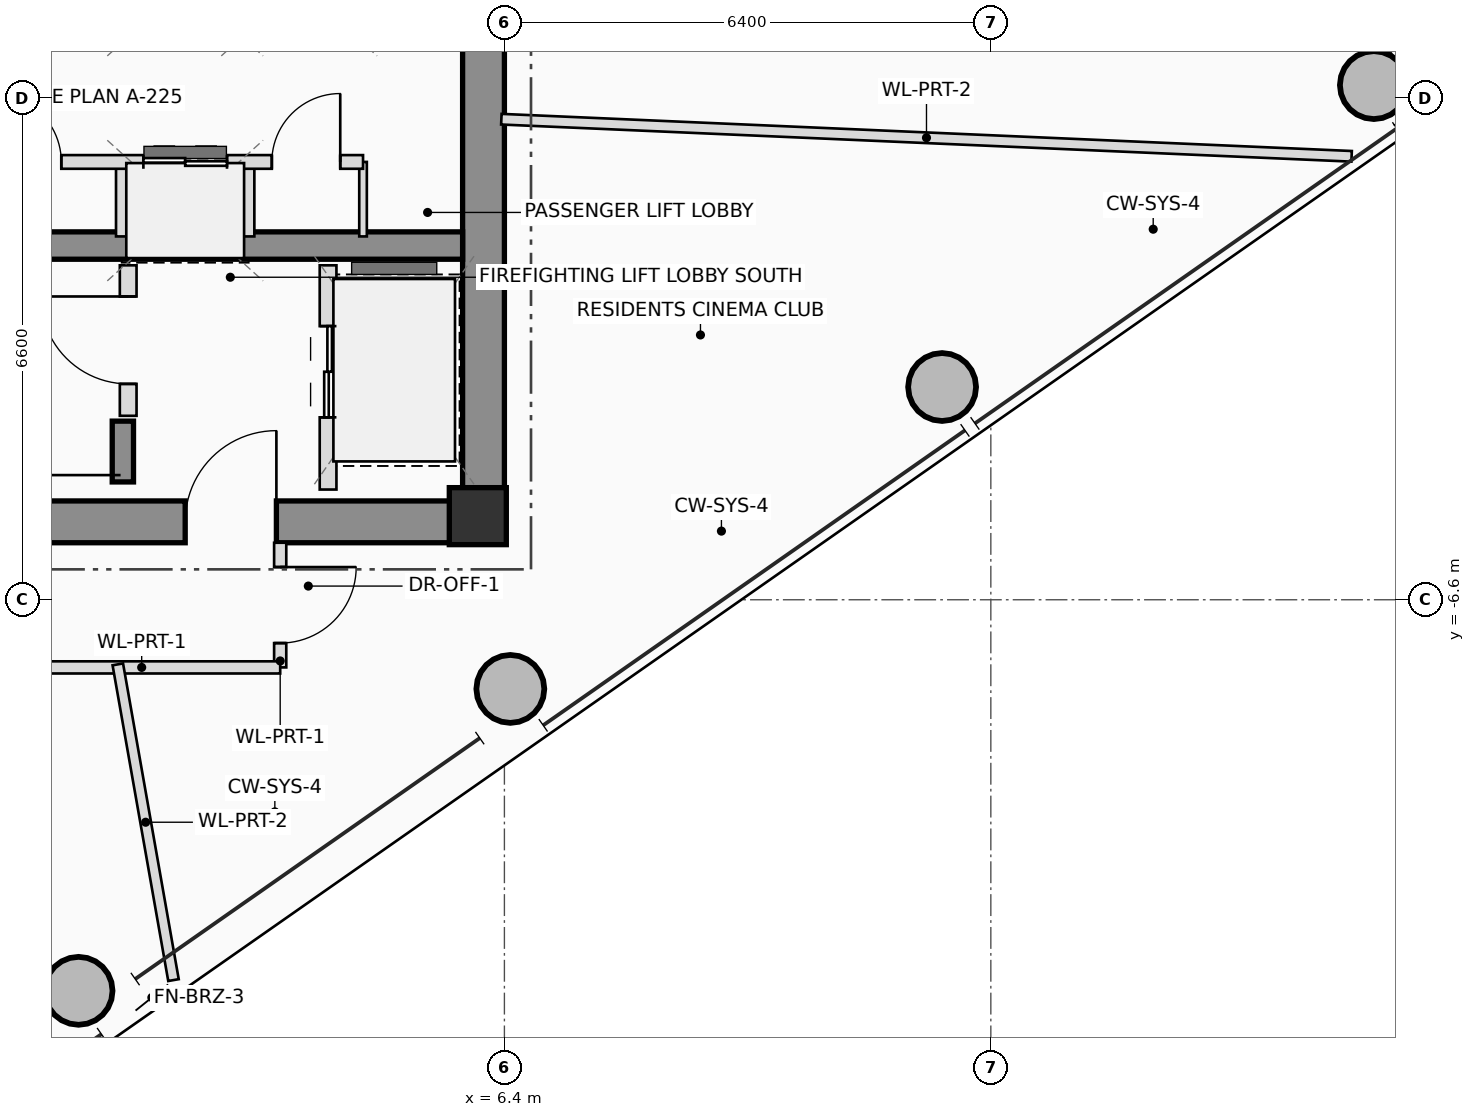
"""IFC4 building model, lengths in metres.
Left out: names, types, materials, properties, quantities, classifications, styles, units other than length and angle.
Written with IfcOpenShell. Run it as: python <this file> out.ifc"""

import sys

from ifc_helpers import new_model, si_unit, direction, frame, frame_2d, origin, origin_2d, place, context, subcontext, project, spatial, rectangle, hollow_circle, extrude, source, transform, mapped, element, fill, save


model = new_model("IFC4")
c1 = context("Model", 3, precision=1e-05, world=origin(), true_north=direction((0.0, 1.0)))
c2 = subcontext(c1, "Body", "Model", "MODEL_VIEW")
j1 = project(units=[si_unit("LENGTHUNIT", "METRE"), si_unit("PLANEANGLEUNIT", "RADIAN")], contexts=[c1])
p1 = place(None, origin())
s1 = spatial("IfcSite", under=j1, at=p1, CompositionType="ELEMENT")
p2 = place(p1, origin())
s2 = spatial("IfcBuilding", under=s1, at=p2, CompositionType="ELEMENT")
p3 = place(p2, frame((0.0, 0.0, 271.15)))
s3 = spatial("IfcBuildingStorey", under=s2, at=p3, CompositionType="ELEMENT", Elevation=271.15)
m1 = source(origin(), c2, "Body", "SweptSolid", [
    extrude(rectangle(XDim=0.75, YDim=0.75, at=origin_2d()), origin(), (0.0, 0.0, 1.0), 3.4),
])
p4 = place(p3, frame((6.05, -5.5, 0.0), z_axis=(0.0, 0.0, 1.0), x_axis=(1.0, 0.0, 0.0)))
e1 = element("IfcColumn", 1, at=p4, inside=s3, PredefinedType="COLUMN", context=c2, shape_type="MappedRepresentation", body=[
    mapped(m1, transform((0.0, 0.0, 0.0), scale=1.0)),
])
p5 = place(p3, frame((-6.4, -5.575, 0.0), z_axis=(0.0, 0.0, 1.0), x_axis=(1.0, 0.0, 0.0)))
e2 = element("IfcWall", 2, at=p5, inside=s3, PredefinedType="SHEAR", context=c2, shape_type="SweptSolid", body=[
    extrude(rectangle(XDim=12.8, YDim=0.55, at=frame_2d((6.4, 0.0))), origin(), (0.0, 0.0, 1.0), 3.4),
])
p6 = place(p5, frame((8.6, 0.0, 0.0)))
e3 = element("IfcOpeningElement", 3, at=p6, cuts=e2, PredefinedType="OPENING", context=c2, shape_type="SweptSolid", body=[
    extrude(rectangle(XDim=1.2, YDim=2.2, at=frame_2d((0.6, 1.1))), frame((0.0, 0.285, 0.0), z_axis=(0.0, -1.0, 0.0), x_axis=(1.0, 0.0, 0.0)), (0.0, 0.0, 1.0), 0.57),
])
p7 = place(p3, frame((6.125, -5.3, 0.0), z_axis=(0.0, 0.0, 1.0), x_axis=(0.0, 1.0, 0.0)))
e4 = element("IfcWall", 4, at=p7, inside=s3, PredefinedType="SHEAR", context=c2, shape_type="SweptSolid", body=[
    extrude(rectangle(XDim=10.6, YDim=0.55, at=frame_2d((5.3, 0.0))), origin(), (0.0, 0.0, 1.0), 3.4),
])
p8 = place(p3, frame((-5.85, -1.94, 0.0), z_axis=(0.0, 0.0, 1.0), x_axis=(1.0, 0.0, 0.0)))
e5 = element("IfcWall", 5, at=p8, inside=s3, PredefinedType="SHEAR", context=c2, shape_type="SweptSolid", body=[
    extrude(rectangle(XDim=11.7, YDim=0.36, at=frame_2d((5.85, 0.0))), origin(), (0.0, 0.0, 1.0), 3.4),
])
p9 = place(p3, frame((1.38, -5.05, 0.0), z_axis=(0.0, 0.0, 1.0), x_axis=(0.0, 1.0, 0.0)))
e6 = element("IfcWall", 6, at=p9, inside=s3, PredefinedType="SHEAR", context=c2, shape_type="SweptSolid", body=[
    extrude(rectangle(XDim=0.8, YDim=0.28, at=frame_2d((0.4, 0.0))), origin(), (0.0, 0.0, 1.0), 3.4),
])
m2 = source(origin(), c2, "Body", "SweptSolid", [
    extrude(hollow_circle(Radius=0.45, WallThickness=0.032, at=origin_2d()), origin(), (0.0, 0.0, 1.0), 3.4),
])
for number, where, z_axis, x_axis in (
    (7, (0.797, -11.745, 0.0), (0.0, 0.0, 1.0), (1.0, 0.0, 0.0)),
    (8, (6.478, -7.773, 0.0), (0.0, 0.0, 1.0), (1.0, 0.0, 0.0)),
    (9, (12.159, -3.801, 0.0), (0.0, 0.0, 1.0), (1.0, 0.0, 0.0)),
    (10, (17.84, 0.171, 0.0), (0.0, 0.0, 1.0), (1.0, 0.0, 0.0)),
):
    element("IfcColumn", number, at=place(p3, frame(where, z_axis=z_axis, x_axis=x_axis)), inside=s3, PredefinedType="COLUMN", context=c2, shape_type="MappedRepresentation", body=[
        mapped(m2, transform((0.0, 0.0, 0.0), scale=1.0)),
    ])
p10 = place(p3, frame((1.45, -4.18, 0.0), z_axis=(0.0, 0.0, 1.0), x_axis=(0.0, 1.0, 0.0)))
e11 = element("IfcWall", 11, at=p10, inside=s3, PredefinedType="PLUMBINGWALL", context=c2, shape_type="SweptSolid", body=[
    extrude(rectangle(XDim=1.98, YDim=0.22, at=frame_2d((0.99, 0.0))), origin(), (0.0, 0.0, 1.0), 3.2),
])
p11 = place(p10, frame((0.42, 0.0, 0.0)))
e12 = element("IfcOpeningElement", 12, at=p11, cuts=e11, PredefinedType="OPENING", context=c2, shape_type="SweptSolid", body=[
    extrude(rectangle(XDim=1.15, YDim=2.15, at=frame_2d((0.575, 1.075))), frame((0.0, 0.12, 0.0), z_axis=(0.0, -1.0, 0.0), x_axis=(1.0, 0.0, 0.0)), (0.0, 0.0, 1.0), 0.24),
])
p12 = place(p3, frame((4.08, -5.15, 0.0), z_axis=(0.0, 0.0, 1.0), x_axis=(0.0, 1.0, 0.0)))
e13 = element("IfcWall", 13, at=p12, inside=s3, PredefinedType="PLUMBINGWALL", context=c2, shape_type="SweptSolid", body=[
    extrude(rectangle(XDim=2.95, YDim=0.22, at=frame_2d((1.475, 0.0))), origin(), (0.0, 0.0, 1.0), 3.2),
])
p13 = place(p12, frame((0.95, 0.0, 0.0)))
e14 = element("IfcOpeningElement", 14, at=p13, cuts=e13, PredefinedType="OPENING", context=c2, shape_type="SweptSolid", body=[
    extrude(rectangle(XDim=1.2, YDim=2.25, at=frame_2d((0.6, 1.125))), frame((0.0, 0.12, 0.0), z_axis=(0.0, -1.0, 0.0), x_axis=(1.0, 0.0, 0.0)), (0.0, 0.0, 1.0), 0.24),
])
for number, where, z_axis, x_axis in (
    (15, (1.38, -1.82, 0.0), (0.0, 0.0, 1.0), (0.0, 1.0, 0.0)),
    (16, (3.02, -1.82, 0.0), (0.0, 0.0, 1.0), (0.0, 1.0, 0.0)),
):
    element("IfcWall", number, at=place(p3, frame(where, z_axis=z_axis, x_axis=x_axis)), inside=s3, PredefinedType="PLUMBINGWALL", context=c2, shape_type="SweptSolid", body=[
        extrude(rectangle(XDim=0.98, YDim=0.18, at=frame_2d((0.49, 0.0))), origin(), (0.0, 0.0, 1.0), 3.2),
    ])
p14 = place(p3, frame((4.54, -1.82, 0.0), z_axis=(0.0, 0.0, 1.0), x_axis=(0.0, 1.0, 0.0)))
e17 = element("IfcWall", 17, at=p14, inside=s3, PredefinedType="PARTITIONING", context=c2, shape_type="SweptSolid", body=[
    extrude(rectangle(XDim=0.98, YDim=0.1, at=frame_2d((0.49, 0.0))), origin(), (0.0, 0.0, 1.0), 3.2),
])
p15 = place(p3, frame((-5.68, -0.84, 0.0), z_axis=(0.0, 0.0, 1.0), x_axis=(1.0, 0.0, 0.0)))
e18 = element("IfcWall", 18, at=p15, inside=s3, PredefinedType="PLUMBINGWALL", context=c2, shape_type="SweptSolid", body=[
    extrude(rectangle(XDim=10.22, YDim=0.18, at=frame_2d((5.11, 0.0))), origin(), (0.0, 0.0, 1.0), 3.2),
])
p16 = place(p15, frame((1.88, 0.0, 0.0)))
e19 = element("IfcOpeningElement", 19, at=p16, cuts=e18, PredefinedType="OPENING", context=c2, shape_type="SweptSolid", body=[
    extrude(rectangle(XDim=0.9, YDim=2.05, at=frame_2d((0.45, 1.025))), frame((0.0, 0.1, 0.0), z_axis=(0.0, -1.0, 0.0), x_axis=(1.0, 0.0, 0.0)), (0.0, 0.0, 1.0), 0.2),
])
p17 = place(p15, frame((5.35, 0.0, 0.0)))
e20 = element("IfcOpeningElement", 20, at=p17, cuts=e18, PredefinedType="OPENING", context=c2, shape_type="SweptSolid", body=[
    extrude(rectangle(XDim=0.9, YDim=2.05, at=frame_2d((0.45, 1.025))), frame((0.0, 0.1, 0.0), z_axis=(0.0, -1.0, 0.0), x_axis=(1.0, 0.0, 0.0)), (0.0, 0.0, 1.0), 0.2),
])
p18 = place(p15, frame((7.33, 0.0, 0.0)))
e21 = element("IfcOpeningElement", 21, at=p18, cuts=e18, PredefinedType="OPENING", context=c2, shape_type="SweptSolid", body=[
    extrude(rectangle(XDim=1.1, YDim=2.2, at=frame_2d((0.55, 1.1))), frame((0.0, 0.1, 0.0), z_axis=(0.0, -1.0, 0.0), x_axis=(1.0, 0.0, 0.0)), (0.0, 0.0, 1.0), 0.2),
])
p19 = place(p15, frame((9.02, 0.0, 0.0)))
e22 = element("IfcOpeningElement", 22, at=p19, cuts=e18, PredefinedType="OPENING", context=c2, shape_type="SweptSolid", body=[
    extrude(rectangle(XDim=0.9, YDim=2.05, at=frame_2d((0.45, 1.025))), frame((0.0, 0.1, 0.0), z_axis=(0.0, -1.0, 0.0), x_axis=(1.0, 0.0, 0.0)), (0.0, 0.0, 1.0), 0.2),
])
p20 = place(p3, frame((3.45, -5.85, 0.0), z_axis=(0.0, 0.0, 1.0), x_axis=(0.0, -1.0, 0.0)))
e23 = element("IfcWall", 23, at=p20, inside=s3, PredefinedType="PARTITIONING", context=c2, shape_type="SweptSolid", body=[
    extrude(rectangle(XDim=1.64, YDim=0.16, at=frame_2d((0.82, 0.0))), origin(), (0.0, 0.0, 1.0), 3.2),
])
p21 = place(p20, frame((0.32, 0.0, 0.0)))
e24 = element("IfcOpeningElement", 24, at=p21, cuts=e23, PredefinedType="OPENING", context=c2, shape_type="SweptSolid", body=[
    extrude(rectangle(XDim=1.0, YDim=2.25, at=frame_2d((0.5, 1.125))), frame((0.0, 0.09, 0.0), z_axis=(0.0, -1.0, 0.0), x_axis=(1.0, 0.0, 0.0)), (0.0, 0.0, 1.0), 0.18),
])
p22 = place(p3, frame((3.45, -7.49, 0.0), z_axis=(0.0, 0.0, 1.0), x_axis=(-1.0, 0.0, 0.0)))
e25 = element("IfcWall", 25, at=p22, inside=s3, PredefinedType="PARTITIONING", context=c2, shape_type="SweptSolid", body=[
    extrude(rectangle(XDim=9.81, YDim=0.16, at=frame_2d((4.905, 0.0))), origin(), (0.0, 0.0, 1.0), 2.605),
])
p23 = place(p22, frame((3.795, 0.0, 0.0)))
e26 = element("IfcOpeningElement", 26, at=p23, cuts=e25, PredefinedType="OPENING", context=c2, shape_type="SweptSolid", body=[
    extrude(rectangle(XDim=1.0, YDim=2.25, at=frame_2d((0.5, 1.125))), frame((0.0, 0.09, 0.0), z_axis=(0.0, -1.0, 0.0), x_axis=(1.0, 0.0, 0.0)), (0.0, 0.0, 1.0), 0.18),
])
p24 = place(p22, frame((7.553, 0.0, 0.0)))
e27 = element("IfcOpeningElement", 27, at=p24, cuts=e25, PredefinedType="OPENING", context=c2, shape_type="SweptSolid", body=[
    extrude(rectangle(XDim=1.0, YDim=2.25, at=frame_2d((0.5, 1.125))), frame((0.0, 0.09, 0.0), z_axis=(0.0, -1.0, 0.0), x_axis=(1.0, 0.0, 0.0)), (0.0, 0.0, 1.0), 0.18),
])
p25 = place(p3, frame((6.36, -0.278, 0.0), z_axis=(0.0, 0.0, 1.0), x_axis=(0.999047788643, -0.043629302162, 0.0)))
e28 = element("IfcWall", 28, at=p25, inside=s3, PredefinedType="PARTITIONING", context=c2, shape_type="SweptSolid", body=[
    extrude(rectangle(XDim=11.197, YDim=0.14, at=frame_2d((5.599, 0.0))), origin(), (0.0, 0.0, 1.0), 2.765),
])
p26 = place(p3, frame((1.314, -7.45, 0.0), z_axis=(0.0, 0.0, 1.0), x_axis=(0.17364664795, -0.984808022741, 0.0)))
e29 = element("IfcWall", 29, at=p26, inside=s3, PredefinedType="PARTITIONING", context=c2, shape_type="SweptSolid", body=[
    extrude(rectangle(XDim=4.218, YDim=0.14, at=frame_2d((2.109, 0.0))), origin(), (0.0, 0.0, 1.0), 2.605),
])
p27 = place(p6, origin())
e30 = element("IfcDoor", 30, at=p27, inside=s3, OperationType="SINGLE_SWING_RIGHT", PredefinedType="DOOR", context=c2, shape_type="SweptSolid", body=[
    extrude(rectangle(XDim=1.2, YDim=2.2, at=frame_2d((0.6, 1.1))), frame((0.0, 0.025, 0.0), z_axis=(0.0, -1.0, 0.0), x_axis=(1.0, 0.0, 0.0)), (0.0, 0.0, 1.0), 0.05),
])
fill(e3, e30)
p28 = place(p11, origin())
e31 = element("IfcDoor", 31, at=p28, inside=s3, OperationType="SINGLE_SWING_RIGHT", PredefinedType="DOOR", context=c2, shape_type="SweptSolid", body=[
    extrude(rectangle(XDim=1.15, YDim=2.15, at=frame_2d((0.575, 1.075))), frame((0.0, 0.025, 0.0), z_axis=(0.0, -1.0, 0.0), x_axis=(1.0, 0.0, 0.0)), (0.0, 0.0, 1.0), 0.05),
])
fill(e12, e31)
p29 = place(p13, origin())
e32 = element("IfcDoor", 32, at=p29, inside=s3, OperationType="DOUBLE_DOOR_SLIDING", PredefinedType="DOOR", context=c2, shape_type="SweptSolid", body=[
    extrude(rectangle(XDim=1.2, YDim=2.25, at=frame_2d((0.6, 1.125))), frame((0.0, 0.025, 0.0), z_axis=(0.0, -1.0, 0.0), x_axis=(1.0, 0.0, 0.0)), (0.0, 0.0, 1.0), 0.05),
])
fill(e14, e32)
p30 = place(p17, origin())
e33 = element("IfcDoor", 33, at=p30, inside=s3, OperationType="SINGLE_SWING_LEFT", PredefinedType="DOOR", context=c2, shape_type="SweptSolid", body=[
    extrude(rectangle(XDim=0.9, YDim=2.05, at=frame_2d((0.45, 1.025))), frame((0.0, 0.025, 0.0), z_axis=(0.0, -1.0, 0.0), x_axis=(1.0, 0.0, 0.0)), (0.0, 0.0, 1.0), 0.05),
])
fill(e20, e33)
p31 = place(p18, origin())
e34 = element("IfcDoor", 34, at=p31, inside=s3, OperationType="DOUBLE_DOOR_SLIDING", PredefinedType="DOOR", context=c2, shape_type="SweptSolid", body=[
    extrude(rectangle(XDim=1.1, YDim=2.2, at=frame_2d((0.55, 1.1))), frame((0.0, 0.025, 0.0), z_axis=(0.0, -1.0, 0.0), x_axis=(1.0, 0.0, 0.0)), (0.0, 0.0, 1.0), 0.05),
])
fill(e21, e34)
p32 = place(p19, origin())
e35 = element("IfcDoor", 35, at=p32, inside=s3, OperationType="SINGLE_SWING_RIGHT", PredefinedType="DOOR", context=c2, shape_type="SweptSolid", body=[
    extrude(rectangle(XDim=0.9, YDim=2.05, at=frame_2d((0.45, 1.025))), frame((0.0, 0.025, 0.0), z_axis=(0.0, -1.0, 0.0), x_axis=(1.0, 0.0, 0.0)), (0.0, 0.0, 1.0), 0.05),
])
fill(e22, e35)
p33 = place(p21, origin())
e36 = element("IfcDoor", 36, at=p33, inside=s3, OperationType="SINGLE_SWING_LEFT", PredefinedType="DOOR", context=c2, shape_type="SweptSolid", body=[
    extrude(rectangle(XDim=1.0, YDim=2.25, at=frame_2d((0.5, 1.125))), frame((0.0, 0.025, 0.0), z_axis=(0.0, -1.0, 0.0), x_axis=(1.0, 0.0, 0.0)), (0.0, 0.0, 1.0), 0.05),
])
fill(e24, e36)
save(model, sys.argv[1])
